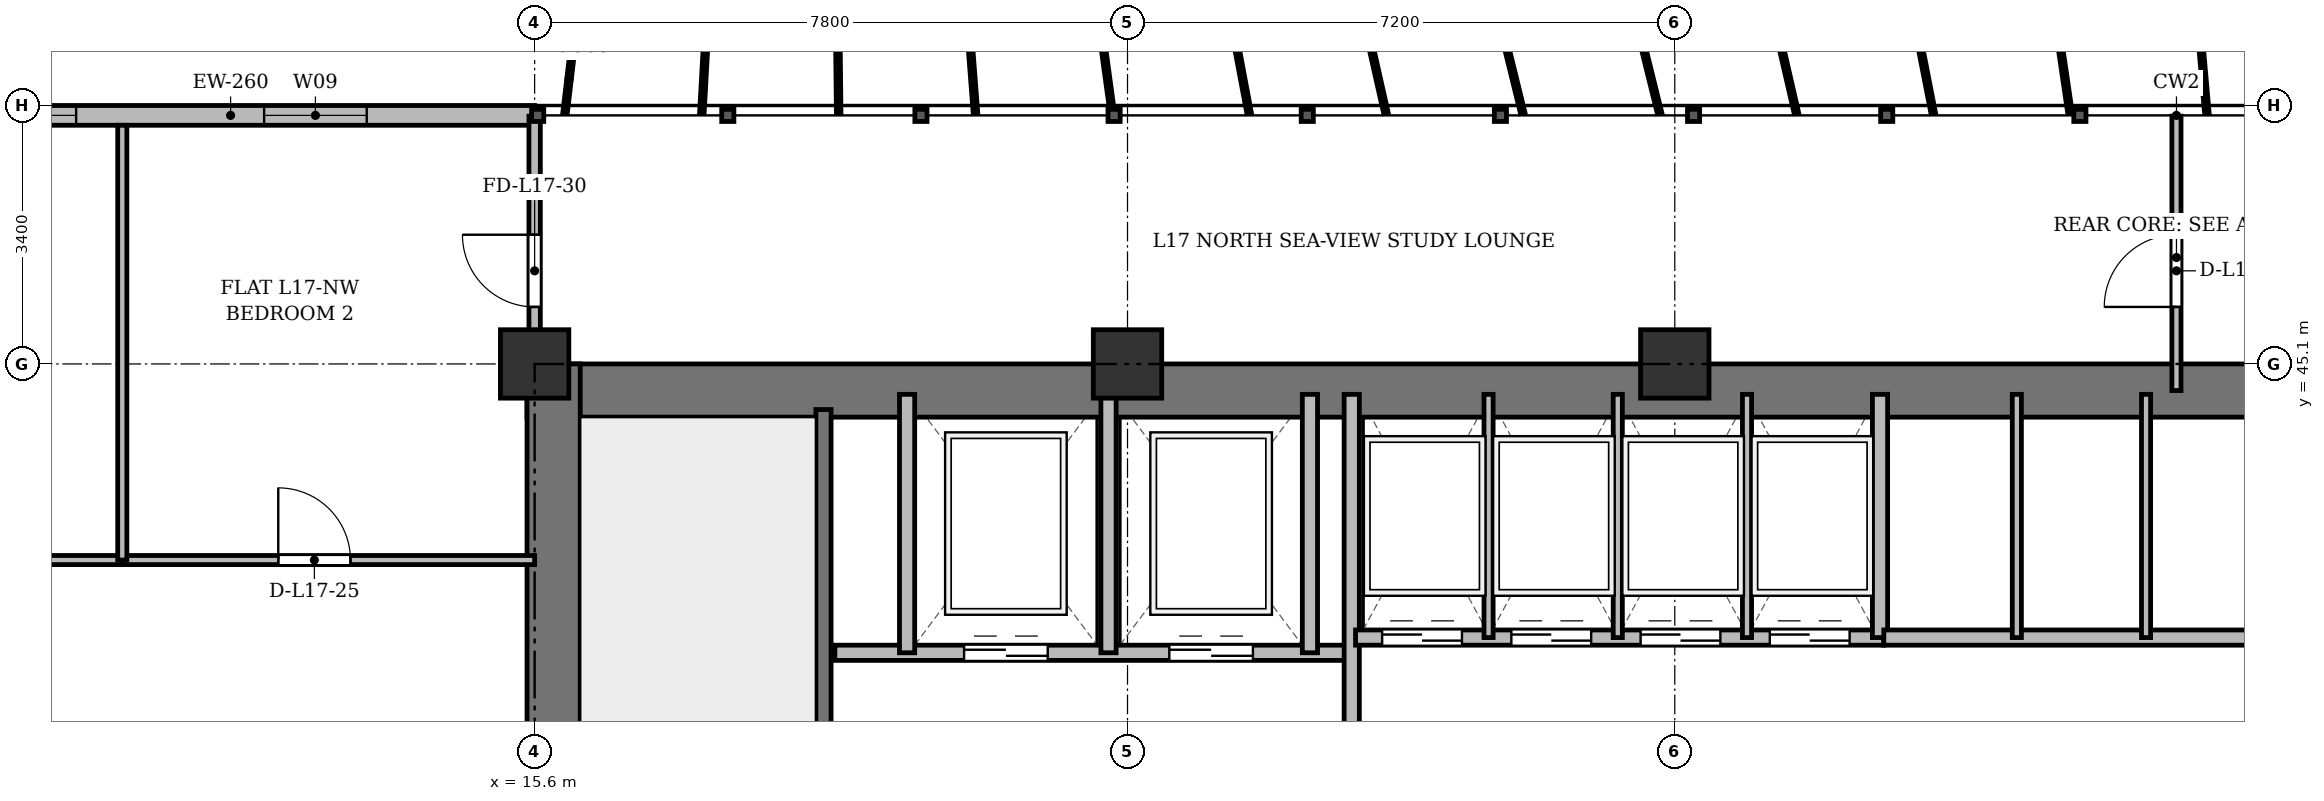
"""IFC4 building model, lengths in metres.
Left out: names, types, materials, properties, quantities, classifications, styles, units other than length and angle.
Written with IfcOpenShell. Run it as: python <this file> out.ifc"""

import sys

from ifc_helpers import new_model, si_unit, direction, frame, frame_2d, origin, origin_2d, place, context, subcontext, project, spatial, rectangle, extrude, source, transform, mapped, element, fill, save


model = new_model("IFC4")
c1 = context("Model", 3, precision=1e-05, world=origin(), true_north=direction((0.0, 1.0)))
c2 = subcontext(c1, "Body", "Model", "MODEL_VIEW")
j1 = project(units=[si_unit("LENGTHUNIT", "METRE"), si_unit("PLANEANGLEUNIT", "RADIAN")], contexts=[c1])
p1 = place(None, origin())
s1 = spatial("IfcSite", under=j1, at=p1, CompositionType="ELEMENT")
p2 = place(p1, origin())
s2 = spatial("IfcBuilding", under=s1, at=p2, CompositionType="ELEMENT")
p3 = place(p2, frame((0.0, 0.0, 66.7)))
s3 = spatial("IfcBuildingStorey", under=s2, at=p3, CompositionType="ELEMENT", Elevation=66.7)
m1 = source(origin(), c2, "Body", "SweptSolid", [
    extrude(rectangle(XDim=0.9, YDim=0.9, at=origin_2d()), origin(), (0.0, 0.0, 1.0), 3.6),
])
for number, where, z_axis, x_axis in (
    (1, (15.6, 45.1, 0.0), (0.0, 0.0, 1.0), (1.0, 0.0, 0.0)),
    (2, (23.4, 45.1, 0.0), (0.0, 0.0, 1.0), (1.0, 0.0, 0.0)),
    (3, (30.6, 45.1, 0.0), (0.0, 0.0, 1.0), (1.0, 0.0, 0.0)),
):
    element("IfcColumn", number, at=place(p3, frame(where, z_axis=z_axis, x_axis=x_axis)), inside=s3, PredefinedType="COLUMN", context=c2, shape_type="MappedRepresentation", body=[
        mapped(m1, transform((0.0, 0.0, 0.0), x_axis=(1.0, 0.0, 0.0), y_axis=(0.0, 1.0, 0.0), z_axis=(0.0, 0.0, 1.0), scale=1.0)),
    ])
p4 = place(p3, frame((7.6, 48.37, 0.0), z_axis=(0.0, 0.0, 1.0), x_axis=(1.0, 0.0, 0.0)))
e4 = element("IfcWall", 4, at=p4, inside=s3, PredefinedType="SOLIDWALL", context=c2, shape_type="SweptSolid", body=[
    extrude(rectangle(XDim=8.0, YDim=0.26, at=frame_2d((4.0, 0.0))), origin(), (0.0, 0.0, 1.0), 3.34),
])
p5 = place(p4, frame((0.768, 0.0, 0.9)))
e5 = element("IfcOpeningElement", 5, at=p5, cuts=e4, PredefinedType="OPENING", context=c2, shape_type="SweptSolid", body=[
    extrude(rectangle(XDim=1.2, YDim=1.65, at=frame_2d((0.6, 0.825))), frame((0.0, 0.14, 0.0), z_axis=(0.0, -1.0, 0.0), x_axis=(1.0, 0.0, 0.0)), (0.0, 0.0, 1.0), 0.28),
])
p6 = place(p4, frame((4.441, 0.0, 0.9)))
e6 = element("IfcOpeningElement", 6, at=p6, cuts=e4, PredefinedType="OPENING", context=c2, shape_type="SweptSolid", body=[
    extrude(rectangle(XDim=1.35, YDim=1.5, at=frame_2d((0.675, 0.75))), frame((0.0, 0.14, 0.0), z_axis=(0.0, -1.0, 0.0), x_axis=(1.0, 0.0, 0.0)), (0.0, 0.0, 1.0), 0.28),
])
p7 = place(p3, frame((15.5, 44.75, 0.0), z_axis=(0.0, 0.0, 1.0), x_axis=(1.0, 0.0, 0.0)))
e7 = element("IfcWall", 7, at=p7, inside=s3, PredefinedType="SHEAR", context=c2, shape_type="SweptSolid", body=[
    extrude(rectangle(XDim=43.4, YDim=0.7, at=frame_2d((21.7, 0.0))), origin(), (0.0, 0.0, 1.0), 3.34),
])
p8 = place(p3, frame((15.85, 33.4, 0.0), z_axis=(0.0, 0.0, 1.0), x_axis=(0.0, 1.0, 0.0)))
e8 = element("IfcWall", 8, at=p8, inside=s3, PredefinedType="SHEAR", context=c2, shape_type="SweptSolid", body=[
    extrude(rectangle(XDim=11.7, YDim=0.7, at=frame_2d((5.85, 0.0))), origin(), (0.0, 0.0, 1.0), 3.34),
])
p9 = place(p3, frame((19.4, 33.4, 0.0), z_axis=(0.0, 0.0, 1.0), x_axis=(0.0, 1.0, 0.0)))
e9 = element("IfcWall", 9, at=p9, inside=s3, PredefinedType="SHEAR", context=c2, shape_type="SweptSolid", body=[
    extrude(rectangle(XDim=11.1, YDim=0.2, at=frame_2d((5.55, 0.0))), origin(), (0.0, 0.0, 1.0), 3.34),
])
p10 = place(p9, frame((0.85, 0.0, 0.0)))
e10 = element("IfcOpeningElement", 10, at=p10, cuts=e9, PredefinedType="OPENING", context=c2, shape_type="SweptSolid", body=[
    extrude(rectangle(XDim=1.1, YDim=2.15, at=frame_2d((0.55, 1.075))), frame((0.0, 0.11, 0.0), z_axis=(0.0, -1.0, 0.0), x_axis=(1.0, 0.0, 0.0)), (0.0, 0.0, 1.0), 0.22),
])
p11 = place(p3, frame((19.55, 41.3, 0.0), z_axis=(0.0, 0.0, 1.0), x_axis=(1.0, 0.0, 0.0)))
e11 = element("IfcWall", 11, at=p11, inside=s3, PredefinedType="SOLIDWALL", context=c2, shape_type="SweptSolid", body=[
    extrude(rectangle(XDim=6.75, YDim=0.2, at=frame_2d((3.375, 0.0))), origin(), (0.0, 0.0, 1.0), 3.34),
])
p12 = place(p11, frame((1.7, 0.0, 0.0)))
e12 = element("IfcOpeningElement", 12, at=p12, cuts=e11, PredefinedType="OPENING", context=c2, shape_type="SweptSolid", body=[
    extrude(rectangle(XDim=1.1, YDim=2.15, at=frame_2d((0.55, 1.075))), frame((0.0, 0.11, 0.0), z_axis=(0.0, -1.0, 0.0), x_axis=(1.0, 0.0, 0.0)), (0.0, 0.0, 1.0), 0.22),
])
p13 = place(p11, frame((4.4, 0.0, 0.0)))
e13 = element("IfcOpeningElement", 13, at=p13, cuts=e11, PredefinedType="OPENING", context=c2, shape_type="SweptSolid", body=[
    extrude(rectangle(XDim=1.1, YDim=2.15, at=frame_2d((0.55, 1.075))), frame((0.0, 0.11, 0.0), z_axis=(0.0, -1.0, 0.0), x_axis=(1.0, 0.0, 0.0)), (0.0, 0.0, 1.0), 0.22),
])
for number, where, z_axis, x_axis in (
    (14, (20.5, 41.3, 0.0), (0.0, 0.0, 1.0), (0.0, 1.0, 0.0)),
    (15, (23.15, 41.3, 0.0), (0.0, 0.0, 1.0), (0.0, 1.0, 0.0)),
    (16, (25.8, 41.3, 0.0), (0.0, 0.0, 1.0), (0.0, 1.0, 0.0)),
):
    element("IfcWall", number, at=place(p3, frame(where, z_axis=z_axis, x_axis=x_axis)), inside=s3, PredefinedType="SOLIDWALL", context=c2, shape_type="SweptSolid", body=[
        extrude(rectangle(XDim=3.4, YDim=0.2, at=frame_2d((1.7, 0.0))), origin(), (0.0, 0.0, 1.0), 3.34),
    ])
p14 = place(p3, frame((26.35, 33.4, 0.0), z_axis=(0.0, 0.0, 1.0), x_axis=(0.0, 1.0, 0.0)))
e17 = element("IfcWall", 17, at=p14, inside=s3, PredefinedType="SOLIDWALL", context=c2, shape_type="SweptSolid", body=[
    extrude(rectangle(XDim=11.3, YDim=0.2, at=frame_2d((5.65, 0.0))), origin(), (0.0, 0.0, 1.0), 2.69),
])
p15 = place(p3, frame((26.4, 41.5, 0.0), z_axis=(0.0, 0.0, 1.0), x_axis=(1.0, 0.0, 0.0)))
e18 = element("IfcWall", 18, at=p15, inside=s3, PredefinedType="SOLIDWALL", context=c2, shape_type="SweptSolid", body=[
    extrude(rectangle(XDim=6.95, YDim=0.2, at=frame_2d((3.475, 0.0))), origin(), (0.0, 0.0, 1.0), 3.34),
])
p16 = place(p15, frame((0.35, 0.0, 0.0)))
e19 = element("IfcOpeningElement", 19, at=p16, cuts=e18, PredefinedType="OPENING", context=c2, shape_type="SweptSolid", body=[
    extrude(rectangle(XDim=1.05, YDim=2.15, at=frame_2d((0.525, 1.075))), frame((0.0, 0.11, 0.0), z_axis=(0.0, -1.0, 0.0), x_axis=(1.0, 0.0, 0.0)), (0.0, 0.0, 1.0), 0.22),
])
p17 = place(p15, frame((2.05, 0.0, 0.0)))
e20 = element("IfcOpeningElement", 20, at=p17, cuts=e18, PredefinedType="OPENING", context=c2, shape_type="SweptSolid", body=[
    extrude(rectangle(XDim=1.05, YDim=2.15, at=frame_2d((0.525, 1.075))), frame((0.0, 0.11, 0.0), z_axis=(0.0, -1.0, 0.0), x_axis=(1.0, 0.0, 0.0)), (0.0, 0.0, 1.0), 0.22),
])
p18 = place(p15, frame((3.75, 0.0, 0.0)))
e21 = element("IfcOpeningElement", 21, at=p18, cuts=e18, PredefinedType="OPENING", context=c2, shape_type="SweptSolid", body=[
    extrude(rectangle(XDim=1.05, YDim=2.15, at=frame_2d((0.525, 1.075))), frame((0.0, 0.11, 0.0), z_axis=(0.0, -1.0, 0.0), x_axis=(1.0, 0.0, 0.0)), (0.0, 0.0, 1.0), 0.22),
])
p19 = place(p15, frame((5.45, 0.0, 0.0)))
e22 = element("IfcOpeningElement", 22, at=p19, cuts=e18, PredefinedType="OPENING", context=c2, shape_type="SweptSolid", body=[
    extrude(rectangle(XDim=1.05, YDim=2.15, at=frame_2d((0.525, 1.075))), frame((0.0, 0.11, 0.0), z_axis=(0.0, -1.0, 0.0), x_axis=(1.0, 0.0, 0.0)), (0.0, 0.0, 1.0), 0.22),
])
p20 = place(p3, frame((33.3, 41.5, 0.0), z_axis=(0.0, 0.0, 1.0), x_axis=(0.0, 1.0, 0.0)))
e23 = element("IfcWall", 23, at=p20, inside=s3, PredefinedType="SOLIDWALL", context=c2, shape_type="SweptSolid", body=[
    extrude(rectangle(XDim=3.2, YDim=0.2, at=frame_2d((1.6, 0.0))), origin(), (0.0, 0.0, 1.0), 3.34),
])
for number, where, z_axis, x_axis in (
    (24, (28.15, 41.5, 0.0), (0.0, 0.0, 1.0), (0.0, 1.0, 0.0)),
    (25, (29.85, 41.5, 0.0), (0.0, 0.0, 1.0), (0.0, 1.0, 0.0)),
    (26, (31.55, 41.5, 0.0), (0.0, 0.0, 1.0), (0.0, 1.0, 0.0)),
):
    element("IfcWall", number, at=place(p3, frame(where, z_axis=z_axis, x_axis=x_axis)), inside=s3, PredefinedType="PARTITIONING", context=c2, shape_type="SweptSolid", body=[
        extrude(rectangle(XDim=3.2, YDim=0.12, at=frame_2d((1.6, 0.0))), origin(), (0.0, 0.0, 1.0), 3.34),
    ])
p21 = place(p3, frame((33.35, 41.5, 0.0), z_axis=(0.0, 0.0, 1.0), x_axis=(1.0, 0.0, 0.0)))
e27 = element("IfcWall", 27, at=p21, inside=s3, PredefinedType="SOLIDWALL", context=c2, shape_type="SweptSolid", body=[
    extrude(rectangle(XDim=6.9, YDim=0.2, at=frame_2d((3.45, 0.0))), origin(), (0.0, 0.0, 1.0), 3.34),
])
for number, where, z_axis, x_axis in (
    (28, (35.1, 41.5, 0.0), (0.0, 0.0, 1.0), (0.0, 1.0, 0.0)),
    (29, (36.8, 41.5, 0.0), (0.0, 0.0, 1.0), (0.0, 1.0, 0.0)),
):
    element("IfcWall", number, at=place(p3, frame(where, z_axis=z_axis, x_axis=x_axis)), inside=s3, PredefinedType="PARTITIONING", context=c2, shape_type="SweptSolid", body=[
        extrude(rectangle(XDim=3.2, YDim=0.12, at=frame_2d((1.6, 0.0))), origin(), (0.0, 0.0, 1.0), 3.34),
    ])
p22 = place(p3, frame((4.75, 42.52, 0.0), z_axis=(0.0, 0.0, 1.0), x_axis=(1.0, 0.0, 0.0)))
e30 = element("IfcWall", 30, at=p22, inside=s3, PredefinedType="PARTITIONING", context=c2, shape_type="SweptSolid", body=[
    extrude(rectangle(XDim=5.425, YDim=0.12, at=frame_2d((2.712, 0.0))), origin(), (0.0, 0.0, 1.0), 2.752),
])
p23 = place(p22, frame((2.423, 0.0, 0.0)))
e31 = element("IfcOpeningElement", 31, at=p23, cuts=e30, PredefinedType="OPENING", context=c2, shape_type="SweptSolid", body=[
    extrude(rectangle(XDim=0.95, YDim=2.15, at=frame_2d((0.475, 1.075))), frame((0.0, 0.07, 0.0), z_axis=(0.0, -1.0, 0.0), x_axis=(1.0, 0.0, 0.0)), (0.0, 0.0, 1.0), 0.14),
])
p24 = place(p3, frame((10.175, 42.52, 0.0), z_axis=(0.0, 0.0, 1.0), x_axis=(1.0, 0.0, 0.0)))
e32 = element("IfcWall", 32, at=p24, inside=s3, PredefinedType="PARTITIONING", context=c2, shape_type="SweptSolid", body=[
    extrude(rectangle(XDim=5.425, YDim=0.12, at=frame_2d((2.712, 0.0))), origin(), (0.0, 0.0, 1.0), 2.752),
])
p25 = place(p24, frame((2.052, 0.0, 0.0)))
e33 = element("IfcOpeningElement", 33, at=p25, cuts=e32, PredefinedType="OPENING", context=c2, shape_type="SweptSolid", body=[
    extrude(rectangle(XDim=0.95, YDim=2.15, at=frame_2d((0.475, 1.075))), frame((0.0, 0.07, 0.0), z_axis=(0.0, -1.0, 0.0), x_axis=(1.0, 0.0, 0.0)), (0.0, 0.0, 1.0), 0.14),
])
p26 = place(p3, frame((10.175, 42.52, 0.0), z_axis=(0.0, 0.0, 1.0), x_axis=(0.0, 1.0, 0.0)))
e34 = element("IfcWall", 34, at=p26, inside=s3, PredefinedType="PARTITIONING", context=c2, shape_type="SweptSolid", body=[
    extrude(rectangle(XDim=5.72, YDim=0.12, at=frame_2d((2.86, 0.0))), origin(), (0.0, 0.0, 1.0), 2.69),
])
p27 = place(p3, frame((37.2, 44.75, 0.0), z_axis=(0.0, 0.0, 1.0), x_axis=(0.0, 1.0, 0.0)))
e35 = element("IfcWall", 35, at=p27, inside=s3, PredefinedType="PARTITIONING", context=c2, shape_type="SweptSolid", body=[
    extrude(rectangle(XDim=3.61, YDim=0.12, at=frame_2d((1.805, 0.0))), origin(), (0.0, 0.0, 1.0), 2.69),
])
p28 = place(p27, frame((1.1, 0.0, 0.0)))
e36 = element("IfcOpeningElement", 36, at=p28, cuts=e35, PredefinedType="OPENING", context=c2, shape_type="SweptSolid", body=[
    extrude(rectangle(XDim=0.95, YDim=2.15, at=frame_2d((0.475, 1.075))), frame((0.0, 0.07, 0.0), z_axis=(0.0, -1.0, 0.0), x_axis=(1.0, 0.0, 0.0)), (0.0, 0.0, 1.0), 0.14),
])
p29 = place(p3, frame((15.6, 44.75, 0.0), z_axis=(0.0, 0.0, 1.0), x_axis=(0.0, 1.0, 0.0)))
e37 = element("IfcWall", 37, at=p29, inside=s3, PredefinedType="PARTITIONING", context=c2, shape_type="SweptSolid", body=[
    extrude(rectangle(XDim=3.61, YDim=0.15, at=frame_2d((1.805, 0.0))), origin(), (0.0, 0.0, 1.0), 2.752),
])
p30 = place(p29, frame((1.1, 0.0, 0.0)))
e38 = element("IfcOpeningElement", 38, at=p30, cuts=e37, PredefinedType="OPENING", context=c2, shape_type="SweptSolid", body=[
    extrude(rectangle(XDim=0.95, YDim=2.15, at=frame_2d((0.475, 1.075))), frame((0.0, 0.085, 0.0), z_axis=(0.0, -1.0, 0.0), x_axis=(1.0, 0.0, 0.0)), (0.0, 0.0, 1.0), 0.17),
])
m2 = source(origin(), c2, "Body", "SweptSolid", [
    extrude(rectangle(XDim=1.2, YDim=1.65, at=frame_2d((0.6, 0.825))), frame((0.0, 0.03, 0.0), z_axis=(0.0, -1.0, 0.0), x_axis=(1.0, 0.0, 0.0)), (0.0, 0.0, 1.0), 0.06),
])
p31 = place(p5, origin())
e39 = element("IfcWindow", 39, at=p31, inside=s3, PartitioningType="SINGLE_PANEL", PredefinedType="WINDOW", context=c2, shape_type="MappedRepresentation", body=[
    mapped(m2, transform((0.0, 0.0, 0.0), x_axis=(1.0, 0.0, 0.0), y_axis=(0.0, 1.0, 0.0), z_axis=(0.0, 0.0, 1.0), scale=1.0)),
])
fill(e5, e39)
m3 = source(origin(), c2, "Body", "SweptSolid", [
    extrude(rectangle(XDim=1.35, YDim=1.5, at=frame_2d((0.675, 0.75))), frame((0.0, 0.03, 0.0), z_axis=(0.0, -1.0, 0.0), x_axis=(1.0, 0.0, 0.0)), (0.0, 0.0, 1.0), 0.06),
])
p32 = place(p6, origin())
e40 = element("IfcWindow", 40, at=p32, inside=s3, PartitioningType="SINGLE_PANEL", PredefinedType="WINDOW", context=c2, shape_type="MappedRepresentation", body=[
    mapped(m3, transform((0.0, 0.0, 0.0), x_axis=(1.0, 0.0, 0.0), y_axis=(0.0, 1.0, 0.0), z_axis=(0.0, 0.0, 1.0), scale=1.0)),
])
fill(e6, e40)
m4 = source(origin(), c2, "Body", "SweptSolid", [
    extrude(rectangle(XDim=1.1, YDim=2.15, at=frame_2d((0.55, 1.075))), frame((0.0, 0.025, 0.0), z_axis=(0.0, -1.0, 0.0), x_axis=(1.0, 0.0, 0.0)), (0.0, 0.0, 1.0), 0.05),
])
p33 = place(p12, origin())
e41 = element("IfcDoor", 41, at=p33, inside=s3, OperationType="DOUBLE_DOOR_SLIDING", PredefinedType="DOOR", context=c2, shape_type="MappedRepresentation", body=[
    mapped(m4, transform((0.0, 0.0, 0.0), x_axis=(1.0, 0.0, 0.0), y_axis=(0.0, 1.0, 0.0), z_axis=(0.0, 0.0, 1.0), scale=1.0)),
])
fill(e12, e41)
p34 = place(p13, origin())
e42 = element("IfcDoor", 42, at=p34, inside=s3, OperationType="DOUBLE_DOOR_SLIDING", PredefinedType="DOOR", context=c2, shape_type="MappedRepresentation", body=[
    mapped(m4, transform((0.0, 0.0, 0.0), x_axis=(1.0, 0.0, 0.0), y_axis=(0.0, 1.0, 0.0), z_axis=(0.0, 0.0, 1.0), scale=1.0)),
])
fill(e13, e42)
m5 = source(origin(), c2, "Body", "SweptSolid", [
    extrude(rectangle(XDim=1.05, YDim=2.15, at=frame_2d((0.525, 1.075))), frame((0.0, 0.025, 0.0), z_axis=(0.0, -1.0, 0.0), x_axis=(1.0, 0.0, 0.0)), (0.0, 0.0, 1.0), 0.05),
])
p35 = place(p16, origin())
e43 = element("IfcDoor", 43, at=p35, inside=s3, OperationType="DOUBLE_DOOR_SLIDING", PredefinedType="DOOR", context=c2, shape_type="MappedRepresentation", body=[
    mapped(m5, transform((0.0, 0.0, 0.0), x_axis=(1.0, 0.0, 0.0), y_axis=(0.0, 1.0, 0.0), z_axis=(0.0, 0.0, 1.0), scale=1.0)),
])
fill(e19, e43)
p36 = place(p17, origin())
e44 = element("IfcDoor", 44, at=p36, inside=s3, OperationType="DOUBLE_DOOR_SLIDING", PredefinedType="DOOR", context=c2, shape_type="MappedRepresentation", body=[
    mapped(m5, transform((0.0, 0.0, 0.0), x_axis=(1.0, 0.0, 0.0), y_axis=(0.0, 1.0, 0.0), z_axis=(0.0, 0.0, 1.0), scale=1.0)),
])
fill(e20, e44)
p37 = place(p18, origin())
e45 = element("IfcDoor", 45, at=p37, inside=s3, OperationType="DOUBLE_DOOR_SLIDING", PredefinedType="DOOR", context=c2, shape_type="MappedRepresentation", body=[
    mapped(m5, transform((0.0, 0.0, 0.0), x_axis=(1.0, 0.0, 0.0), y_axis=(0.0, 1.0, 0.0), z_axis=(0.0, 0.0, 1.0), scale=1.0)),
])
fill(e21, e45)
p38 = place(p19, origin())
e46 = element("IfcDoor", 46, at=p38, inside=s3, OperationType="DOUBLE_DOOR_SLIDING", PredefinedType="DOOR", context=c2, shape_type="MappedRepresentation", body=[
    mapped(m5, transform((0.0, 0.0, 0.0), x_axis=(1.0, 0.0, 0.0), y_axis=(0.0, 1.0, 0.0), z_axis=(0.0, 0.0, 1.0), scale=1.0)),
])
fill(e22, e46)
m6 = source(origin(), c2, "Body", "SweptSolid", [
    extrude(rectangle(XDim=0.95, YDim=2.15, at=frame_2d((0.475, 1.075))), frame((0.0, 0.025, 0.0), z_axis=(0.0, -1.0, 0.0), x_axis=(1.0, 0.0, 0.0)), (0.0, 0.0, 1.0), 0.05),
])
p39 = place(p25, origin())
e47 = element("IfcDoor", 47, at=p39, inside=s3, OperationType="SINGLE_SWING_LEFT", PredefinedType="DOOR", context=c2, shape_type="MappedRepresentation", body=[
    mapped(m6, transform((0.0, 0.0, 0.0), x_axis=(1.0, 0.0, 0.0), y_axis=(0.0, 1.0, 0.0), z_axis=(0.0, 0.0, 1.0), scale=1.0)),
])
fill(e33, e47)
p40 = place(p28, origin())
e48 = element("IfcDoor", 48, at=p40, inside=s3, OperationType="SINGLE_SWING_LEFT", PredefinedType="DOOR", context=c2, shape_type="MappedRepresentation", body=[
    mapped(m6, transform((0.0, 0.0, 0.0), x_axis=(1.0, 0.0, 0.0), y_axis=(0.0, 1.0, 0.0), z_axis=(0.0, 0.0, 1.0), scale=1.0)),
])
fill(e36, e48)
p41 = place(p30, origin())
e49 = element("IfcDoor", 49, at=p41, inside=s3, OperationType="SINGLE_SWING_RIGHT", PredefinedType="DOOR", context=c2, shape_type="MappedRepresentation", body=[
    mapped(m6, transform((0.0, 0.0, 0.0), x_axis=(1.0, 0.0, 0.0), y_axis=(0.0, 1.0, 0.0), z_axis=(0.0, 0.0, 1.0), scale=1.0)),
])
fill(e38, e49)
save(model, sys.argv[1])
